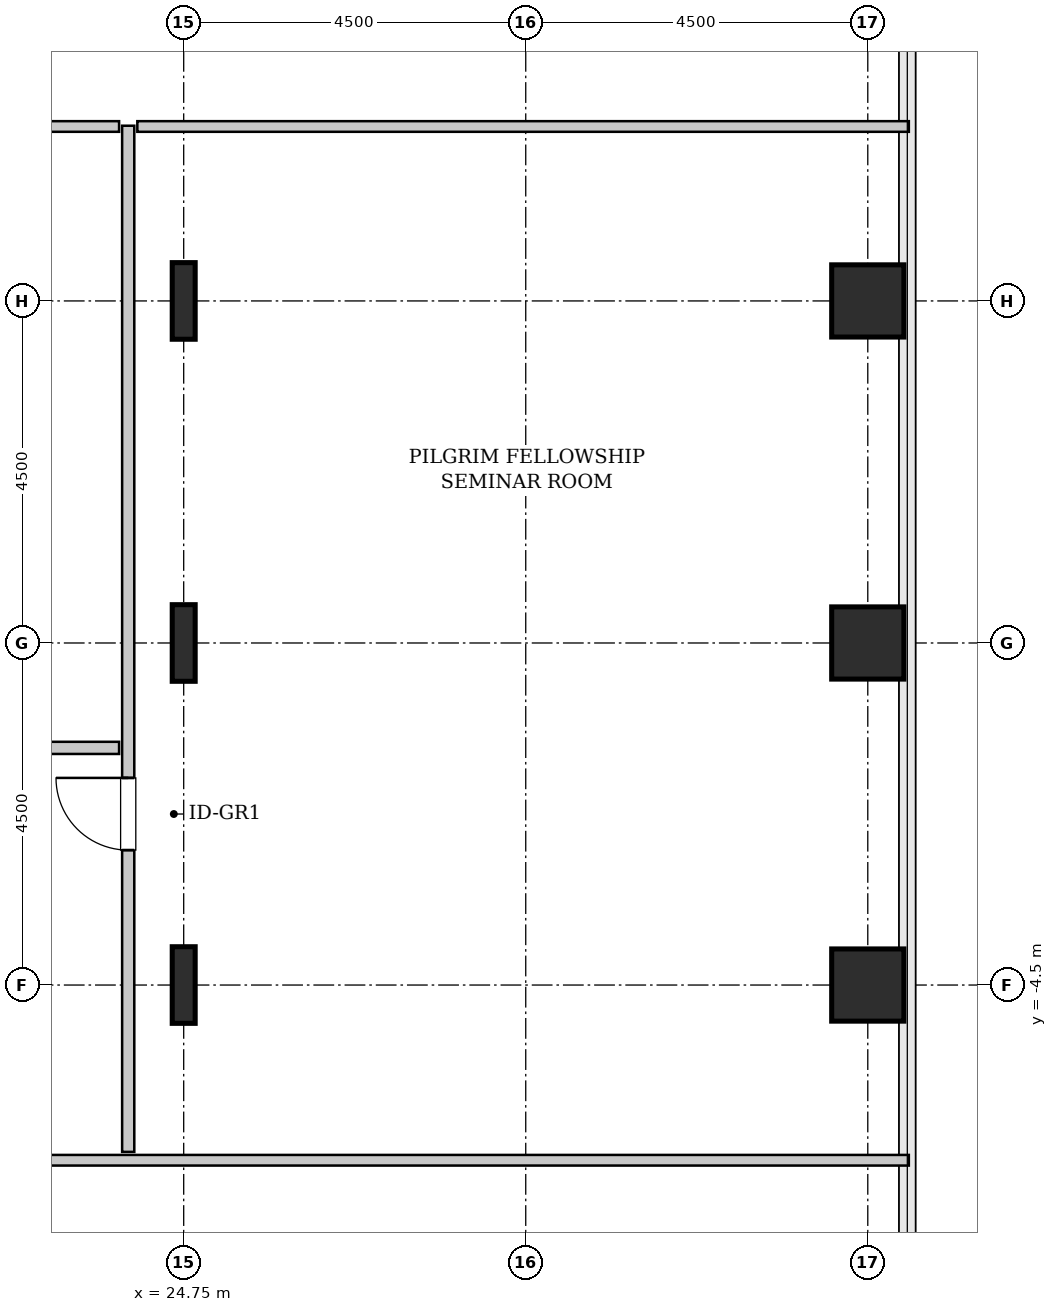
"""IFC4 building model, lengths in metres.
Left out: names, types, materials, properties, quantities, classifications, styles, units other than length and angle.
Written with IfcOpenShell. Run it as: python <this file> out.ifc"""

import sys

from ifc_helpers import new_model, si_unit, direction, frame, frame_2d, origin, origin_2d, place, context, subcontext, project, spatial, rectangle, hollow_rectangle, i_section, extrude, source, transform, mapped, element, fill, save


model = new_model("IFC4")
c1 = context("Model", 3, precision=1e-05, world=origin(), true_north=direction((0.0, 1.0)))
c2 = subcontext(c1, "Body", "Model", "MODEL_VIEW")
j1 = project(units=[si_unit("LENGTHUNIT", "METRE"), si_unit("PLANEANGLEUNIT", "RADIAN")], contexts=[c1])
p1 = place(None, origin())
s1 = spatial("IfcSite", under=j1, at=p1, CompositionType="ELEMENT")
p2 = place(p1, origin())
s2 = spatial("IfcBuilding", under=s1, at=p2, CompositionType="ELEMENT")
p3 = place(p2, frame((0.0, 0.0, 98.4)))
s3 = spatial("IfcBuildingStorey", under=s2, at=p3, CompositionType="ELEMENT", Elevation=98.4)
m1 = source(origin(), c2, "Body", "SweptSolid", [
    extrude(i_section(OverallWidth=0.302, OverallDepth=1.008, WebThickness=0.021, FlangeThickness=0.04, FilletRadius=0.03, at=origin_2d()), origin(), (0.0, 0.0, 1.0), 3.8),
])
for number, where, z_axis, x_axis in (
    (1, (24.75, -4.5, 0.0), (0.0, 0.0, 1.0), (1.0, 0.0, 0.0)),
    (2, (24.75, 0.0, 0.0), (0.0, 0.0, 1.0), (1.0, 0.0, 0.0)),
    (3, (24.75, 4.5, 0.0), (0.0, 0.0, 1.0), (1.0, 0.0, 0.0)),
):
    element("IfcColumn", number, at=place(p3, frame(where, z_axis=z_axis, x_axis=x_axis)), inside=s3, PredefinedType="COLUMN", context=c2, shape_type="MappedRepresentation", body=[
        mapped(m1, transform((0.0, 0.0, 0.0), x_axis=(1.0, 0.0, 0.0), y_axis=(0.0, 1.0, 0.0), z_axis=(0.0, 0.0, 1.0), scale=1.0)),
    ])
m2 = source(origin(), c2, "Body", "SweptSolid", [
    extrude(hollow_rectangle(XDim=0.95, YDim=0.95, WallThickness=0.045, InnerFilletRadius=0.045, OuterFilletRadius=0.09, at=origin_2d()), origin(), (0.0, 0.0, 1.0), 3.8),
])
for number, where, z_axis, x_axis in (
    (4, (33.75, -4.5, 0.0), (0.0, 0.0, 1.0), (1.0, 0.0, 0.0)),
    (5, (33.75, 0.0, 0.0), (0.0, 0.0, 1.0), (1.0, 0.0, 0.0)),
    (6, (33.75, 4.5, 0.0), (0.0, 0.0, 1.0), (1.0, 0.0, 0.0)),
):
    element("IfcColumn", number, at=place(p3, frame(where, z_axis=z_axis, x_axis=x_axis)), inside=s3, PredefinedType="COLUMN", context=c2, shape_type="MappedRepresentation", body=[
        mapped(m2, transform((0.0, 0.0, 0.0), x_axis=(1.0, 0.0, 0.0), y_axis=(0.0, 1.0, 0.0), z_axis=(0.0, 0.0, 1.0), scale=1.0)),
    ])
m3 = source(origin(), c2, "Body", "SweptSolid", [
    extrude(rectangle(XDim=20.43, YDim=0.14, at=frame_2d((10.215, 0.0))), origin(), (0.0, 0.0, 1.0), 3.535),
])
p4 = place(p3, frame((13.86, -6.805, 0.0), z_axis=(0.0, 0.0, 1.0), x_axis=(1.0, 0.0, 0.0)))
e7 = element("IfcWall", 7, at=p4, inside=s3, PredefinedType="PARTITIONING", context=c2, shape_type="MappedRepresentation", body=[
    mapped(m3, transform((0.0, 0.0, 0.0), x_axis=(1.0, 0.0, 0.0), y_axis=(0.0, 1.0, 0.0), z_axis=(0.0, 0.0, 1.0), scale=1.0)),
])
m4 = source(origin(), c2, "Body", "SweptSolid", [
    extrude(rectangle(XDim=13.5, YDim=0.16, at=frame_2d((6.75, 0.0))), origin(), (0.0, 0.0, 1.0), 3.535),
])
p5 = place(p3, frame((24.02, -6.695, 0.0), z_axis=(0.0, 0.0, 1.0), x_axis=(0.0, 1.0, 0.0)))
e8 = element("IfcWall", 8, at=p5, inside=s3, PredefinedType="PARTITIONING", context=c2, shape_type="MappedRepresentation", body=[
    mapped(m4, transform((0.0, 0.0, 0.0), x_axis=(1.0, 0.0, 0.0), y_axis=(0.0, 1.0, 0.0), z_axis=(0.0, 0.0, 1.0), scale=1.0)),
])
p6 = place(p5, frame((3.97, 0.0, 0.0)))
e9 = element("IfcOpeningElement", 9, at=p6, cuts=e8, PredefinedType="OPENING", context=c2, shape_type="SweptSolid", body=[
    extrude(rectangle(XDim=0.95, YDim=2.1, at=frame_2d((0.475, 1.05))), frame((0.0, 0.09, 0.0), z_axis=(0.0, -1.0, 0.0), x_axis=(1.0, 0.0, 0.0)), (0.0, 0.0, 1.0), 0.18),
])
m5 = source(origin(), c2, "Body", "SweptSolid", [
    extrude(rectangle(XDim=10.17, YDim=0.14, at=frame_2d((5.085, 0.0))), origin(), (0.0, 0.0, 1.0), 3.535),
])
p7 = place(p3, frame((13.73, 6.795, 0.0), z_axis=(0.0, 0.0, 1.0), x_axis=(1.0, 0.0, 0.0)))
e10 = element("IfcWall", 10, at=p7, inside=s3, PredefinedType="PARTITIONING", context=c2, shape_type="MappedRepresentation", body=[
    mapped(m5, transform((0.0, 0.0, 0.0), x_axis=(1.0, 0.0, 0.0), y_axis=(0.0, 1.0, 0.0), z_axis=(0.0, 0.0, 1.0), scale=1.0)),
])
m6 = source(origin(), c2, "Body", "SweptSolid", [
    extrude(rectangle(XDim=10.15, YDim=0.14, at=frame_2d((5.075, 0.0))), origin(), (0.0, 0.0, 1.0), 3.535),
])
p8 = place(p3, frame((24.14, 6.795, 0.0), z_axis=(0.0, 0.0, 1.0), x_axis=(1.0, 0.0, 0.0)))
e11 = element("IfcWall", 11, at=p8, inside=s3, PredefinedType="PARTITIONING", context=c2, shape_type="MappedRepresentation", body=[
    mapped(m6, transform((0.0, 0.0, 0.0), x_axis=(1.0, 0.0, 0.0), y_axis=(0.0, 1.0, 0.0), z_axis=(0.0, 0.0, 1.0), scale=1.0)),
])
m7 = source(origin(), c2, "Body", "SweptSolid", [
    extrude(rectangle(XDim=5.045, YDim=0.16, at=frame_2d((2.522, 0.0))), origin(), (0.0, 0.0, 1.0), 3.535),
])
p9 = place(p3, frame((18.855, -1.38, 0.0), z_axis=(0.0, 0.0, 1.0), x_axis=(1.0, 0.0, 0.0)))
e12 = element("IfcWall", 12, at=p9, inside=s3, PredefinedType="PARTITIONING", context=c2, shape_type="MappedRepresentation", body=[
    mapped(m7, transform((0.0, 0.0, 0.0), x_axis=(1.0, 0.0, 0.0), y_axis=(0.0, 1.0, 0.0), z_axis=(0.0, 0.0, 1.0), scale=1.0)),
])
p10 = place(p9, frame((2.048, 0.0, 0.0)))
e13 = element("IfcOpeningElement", 13, at=p10, cuts=e12, PredefinedType="OPENING", context=c2, shape_type="SweptSolid", body=[
    extrude(rectangle(XDim=0.95, YDim=2.1, at=frame_2d((0.475, 1.05))), frame((0.0, 0.09, 0.0), z_axis=(0.0, -1.0, 0.0), x_axis=(1.0, 0.0, 0.0)), (0.0, 0.0, 1.0), 0.18),
])
m8 = source(origin(), c2, "Body", "SweptSolid", [
    extrude(rectangle(XDim=0.95, YDim=2.1, at=frame_2d((0.475, 1.05))), frame((0.0, 0.025, 0.0), z_axis=(0.0, -1.0, 0.0), x_axis=(1.0, 0.0, 0.0)), (0.0, 0.0, 1.0), 0.05),
])
p11 = place(p6, origin())
e14 = element("IfcDoor", 14, at=p11, inside=s3, OperationType="SINGLE_SWING_RIGHT", PredefinedType="DOOR", context=c2, shape_type="MappedRepresentation", body=[
    mapped(m8, transform((0.0, 0.0, 0.0), x_axis=(1.0, 0.0, 0.0), y_axis=(0.0, 1.0, 0.0), z_axis=(0.0, 0.0, 1.0), scale=1.0)),
])
fill(e9, e14)
save(model, sys.argv[1])
